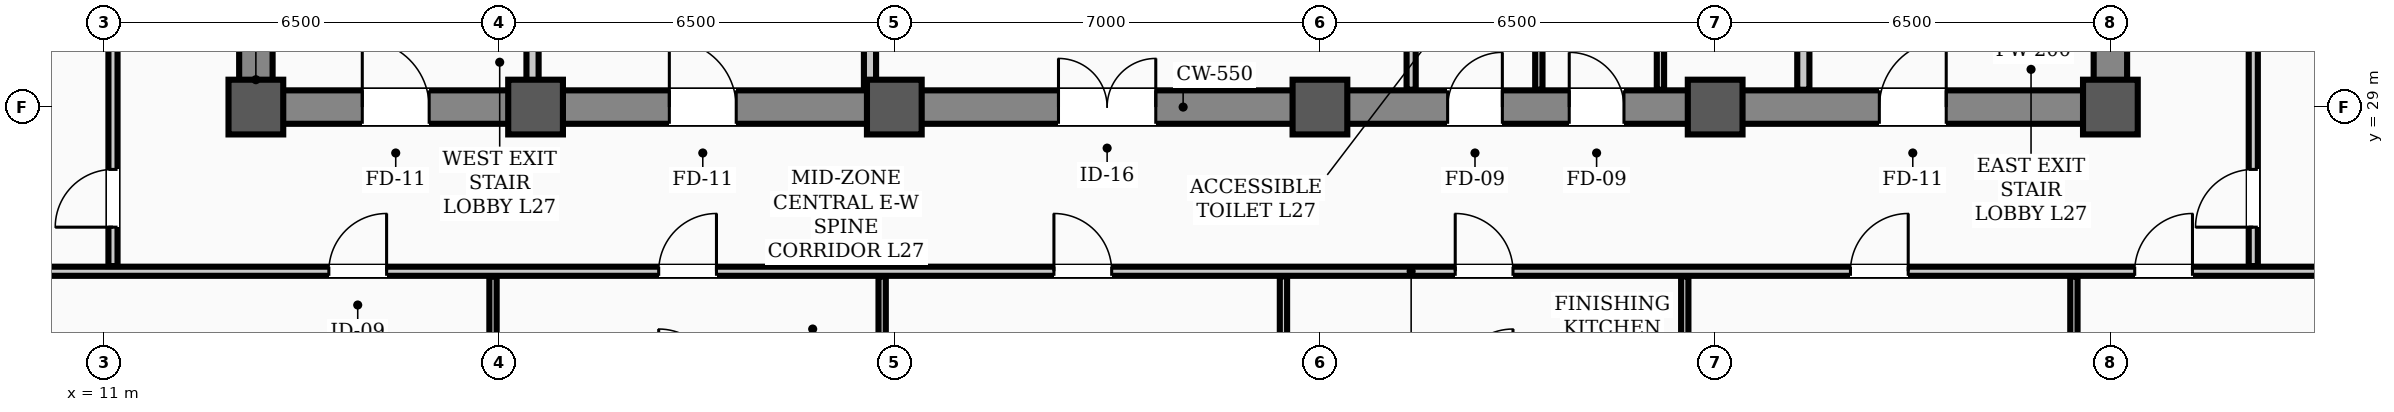
"""IFC4 building model, lengths in metres.
Left out: names, types, materials, properties, quantities, classifications, styles, units other than length and angle.
Written with IfcOpenShell. Run it as: python <this file> out.ifc"""

import sys

from ifc_helpers import new_model, si_unit, direction, frame, frame_2d, origin, origin_2d, place, context, subcontext, project, spatial, rectangle, hollow_rectangle, extrude, element, fill, save


model = new_model("IFC4")
c1 = context("Model", 3, precision=1e-05, world=origin(), true_north=direction((0.0, 1.0)))
c2 = subcontext(c1, "Body", "Model", "MODEL_VIEW")
j1 = project(units=[si_unit("LENGTHUNIT", "METRE"), si_unit("PLANEANGLEUNIT", "RADIAN")], contexts=[c1])
p1 = place(None, origin())
s1 = spatial("IfcSite", under=j1, at=p1, CompositionType="ELEMENT")
p2 = place(p1, origin())
s2 = spatial("IfcBuilding", under=s1, at=p2, CompositionType="ELEMENT")
p3 = place(p2, frame((0.0, 0.0, 111.0)))
s3 = spatial("IfcBuildingStorey", under=s2, at=p3, CompositionType="ELEMENT", Elevation=111.0)
for number, where, z_axis, x_axis in (
    (1, (13.5, 29.0, 0.0), (0.0, 0.0, 1.0), (1.0, 0.0, 0.0)),
    (2, (18.1, 29.0, 0.0), (0.0, 0.0, 1.0), (1.0, 0.0, 0.0)),
    (3, (24.0, 29.0, 0.0), (0.0, 0.0, 1.0), (1.0, 0.0, 0.0)),
    (4, (31.0, 29.0, 0.0), (0.0, 0.0, 1.0), (1.0, 0.0, 0.0)),
    (5, (37.5, 29.0, 0.0), (0.0, 0.0, 1.0), (1.0, 0.0, 0.0)),
    (6, (44.0, 29.0, 0.0), (0.0, 0.0, 1.0), (1.0, 0.0, 0.0)),
):
    element("IfcColumn", number, at=place(p3, frame(where, z_axis=z_axis, x_axis=x_axis)), inside=s3, PredefinedType="COLUMN", context=c2, shape_type="SweptSolid", body=[
        extrude(hollow_rectangle(XDim=0.9, YDim=0.9, WallThickness=0.035, InnerFilletRadius=0.017, OuterFilletRadius=0.052, at=origin_2d()), origin(), (0.0, 0.0, 1.0), 3.9),
    ])
p4 = place(p3, frame((13.5, 29.0, 0.0), z_axis=(0.0, 0.0, 1.0), x_axis=(1.0, 0.0, 0.0)))
e7 = element("IfcWall", 7, at=p4, inside=s3, PredefinedType="SHEAR", context=c2, shape_type="SweptSolid", body=[
    extrude(rectangle(XDim=30.5, YDim=0.55, at=frame_2d((15.25, 0.0))), origin(), (0.0, 0.0, 1.0), 3.66),
])
p5 = place(p4, frame((1.75, 0.0, 0.0)))
e8 = element("IfcOpeningElement", 8, at=p5, cuts=e7, PredefinedType="OPENING", context=c2, shape_type="SweptSolid", body=[
    extrude(rectangle(XDim=1.1, YDim=2.08, at=frame_2d((0.55, 1.04))), frame((0.0, 0.285, 0.0), z_axis=(0.0, -1.0, 0.0), x_axis=(1.0, 0.0, 0.0)), (0.0, 0.0, 1.0), 0.57),
])
p6 = place(p4, frame((26.7, 0.0, 0.0)))
e9 = element("IfcOpeningElement", 9, at=p6, cuts=e7, PredefinedType="OPENING", context=c2, shape_type="SweptSolid", body=[
    extrude(rectangle(XDim=1.1, YDim=2.08, at=frame_2d((0.55, 1.04))), frame((0.0, 0.285, 0.0), z_axis=(0.0, -1.0, 0.0), x_axis=(1.0, 0.0, 0.0)), (0.0, 0.0, 1.0), 0.57),
])
p7 = place(p4, frame((6.8, 0.0, 0.0)))
e10 = element("IfcOpeningElement", 10, at=p7, cuts=e7, PredefinedType="OPENING", context=c2, shape_type="SweptSolid", body=[
    extrude(rectangle(XDim=1.1, YDim=2.08, at=frame_2d((0.55, 1.04))), frame((0.0, 0.285, 0.0), z_axis=(0.0, -1.0, 0.0), x_axis=(1.0, 0.0, 0.0)), (0.0, 0.0, 1.0), 0.57),
])
p8 = place(p4, frame((13.2, 0.0, 0.0)))
e11 = element("IfcOpeningElement", 11, at=p8, cuts=e7, PredefinedType="OPENING", context=c2, shape_type="SweptSolid", body=[
    extrude(rectangle(XDim=1.6, YDim=2.08, at=frame_2d((0.8, 1.04))), frame((0.0, 0.285, 0.0), z_axis=(0.0, -1.0, 0.0), x_axis=(1.0, 0.0, 0.0)), (0.0, 0.0, 1.0), 0.57),
])
p9 = place(p4, frame((19.6, 0.0, 0.0)))
e12 = element("IfcOpeningElement", 12, at=p9, cuts=e7, PredefinedType="OPENING", context=c2, shape_type="SweptSolid", body=[
    extrude(rectangle(XDim=0.9, YDim=2.08, at=frame_2d((0.45, 1.04))), frame((0.0, 0.285, 0.0), z_axis=(0.0, -1.0, 0.0), x_axis=(1.0, 0.0, 0.0)), (0.0, 0.0, 1.0), 0.57),
])
p10 = place(p4, frame((21.6, 0.0, 0.0)))
e13 = element("IfcOpeningElement", 13, at=p10, cuts=e7, PredefinedType="OPENING", context=c2, shape_type="SweptSolid", body=[
    extrude(rectangle(XDim=0.9, YDim=2.08, at=frame_2d((0.45, 1.04))), frame((0.0, 0.285, 0.0), z_axis=(0.0, -1.0, 0.0), x_axis=(1.0, 0.0, 0.0)), (0.0, 0.0, 1.0), 0.57),
])
for number, where, z_axis, x_axis in (
    (14, (13.5, 29.35, 0.0), (0.0, 0.0, 1.0), (0.0, 1.0, 0.0)),
    (15, (44.0, 29.35, 0.0), (0.0, 0.0, 1.0), (0.0, 1.0, 0.0)),
):
    element("IfcWall", number, at=place(p3, frame(where, z_axis=z_axis, x_axis=x_axis)), inside=s3, PredefinedType="SHEAR", context=c2, shape_type="SweptSolid", body=[
        extrude(rectangle(XDim=8.6, YDim=0.55, at=frame_2d((4.3, 0.0))), origin(), (0.0, 0.0, 1.0), 3.66),
    ])
p11 = place(p3, frame((7.81, 26.3, 0.0), z_axis=(0.0, 0.0, 1.0), x_axis=(1.0, 0.0, 0.0)))
e16 = element("IfcWall", 16, at=p11, inside=s3, PredefinedType="PARTITIONING", context=c2, shape_type="SweptSolid", body=[
    extrude(rectangle(XDim=49.38, YDim=0.15, at=frame_2d((24.69, 0.0))), origin(), (0.0, 0.0, 1.0), 2.24),
])
p12 = place(p11, frame((6.89, 0.0, 0.0)))
e17 = element("IfcOpeningElement", 17, at=p12, cuts=e16, PredefinedType="OPENING", context=c2, shape_type="SweptSolid", body=[
    extrude(rectangle(XDim=0.95, YDim=2.08, at=frame_2d((0.475, 1.04))), frame((0.0, 0.085, 0.0), z_axis=(0.0, -1.0, 0.0), x_axis=(1.0, 0.0, 0.0)), (0.0, 0.0, 1.0), 0.17),
])
p13 = place(p11, frame((12.315, 0.0, 0.0)))
e18 = element("IfcOpeningElement", 18, at=p13, cuts=e16, PredefinedType="OPENING", context=c2, shape_type="SweptSolid", body=[
    extrude(rectangle(XDim=0.95, YDim=2.08, at=frame_2d((0.475, 1.04))), frame((0.0, 0.085, 0.0), z_axis=(0.0, -1.0, 0.0), x_axis=(1.0, 0.0, 0.0)), (0.0, 0.0, 1.0), 0.17),
])
p14 = place(p11, frame((18.815, 0.0, 0.0)))
e19 = element("IfcOpeningElement", 19, at=p14, cuts=e16, PredefinedType="OPENING", context=c2, shape_type="SweptSolid", body=[
    extrude(rectangle(XDim=0.95, YDim=2.08, at=frame_2d((0.475, 1.04))), frame((0.0, 0.085, 0.0), z_axis=(0.0, -1.0, 0.0), x_axis=(1.0, 0.0, 0.0)), (0.0, 0.0, 1.0), 0.17),
])
p15 = place(p11, frame((25.415, 0.0, 0.0)))
e20 = element("IfcOpeningElement", 20, at=p15, cuts=e16, PredefinedType="OPENING", context=c2, shape_type="SweptSolid", body=[
    extrude(rectangle(XDim=0.95, YDim=2.08, at=frame_2d((0.475, 1.04))), frame((0.0, 0.085, 0.0), z_axis=(0.0, -1.0, 0.0), x_axis=(1.0, 0.0, 0.0)), (0.0, 0.0, 1.0), 0.17),
])
p16 = place(p11, frame((31.915, 0.0, 0.0)))
e21 = element("IfcOpeningElement", 21, at=p16, cuts=e16, PredefinedType="OPENING", context=c2, shape_type="SweptSolid", body=[
    extrude(rectangle(XDim=0.95, YDim=2.08, at=frame_2d((0.475, 1.04))), frame((0.0, 0.085, 0.0), z_axis=(0.0, -1.0, 0.0), x_axis=(1.0, 0.0, 0.0)), (0.0, 0.0, 1.0), 0.17),
])
p17 = place(p11, frame((36.59, 0.0, 0.0)))
e22 = element("IfcOpeningElement", 22, at=p17, cuts=e16, PredefinedType="OPENING", context=c2, shape_type="SweptSolid", body=[
    extrude(rectangle(XDim=0.95, YDim=2.08, at=frame_2d((0.475, 1.04))), frame((0.0, 0.085, 0.0), z_axis=(0.0, -1.0, 0.0), x_axis=(1.0, 0.0, 0.0)), (0.0, 0.0, 1.0), 0.17),
])
for number, where, z_axis, x_axis in (
    (23, (18.05, 29.285, 0.0), (0.0, 0.0, 1.0), (0.0, 1.0, 0.0)),
    (24, (38.95, 29.285, 0.0), (0.0, 0.0, 1.0), (0.0, 1.0, 0.0)),
):
    element("IfcWall", number, at=place(p3, frame(where, z_axis=z_axis, x_axis=x_axis)), inside=s3, PredefinedType="STANDARD", context=c2, shape_type="SweptSolid", body=[
        extrude(rectangle(XDim=1.015, YDim=0.2, at=frame_2d((0.508, 0.0))), origin(), (0.0, 0.0, 1.0), 2.24),
    ])
p18 = place(p3, frame((23.6, 29.285, 0.0), z_axis=(0.0, 0.0, 1.0), x_axis=(0.0, 1.0, 0.0)))
e25 = element("IfcWall", 25, at=p18, inside=s3, PredefinedType="STANDARD", context=c2, shape_type="SweptSolid", body=[
    extrude(rectangle(XDim=5.415, YDim=0.2, at=frame_2d((2.708, 0.0))), origin(), (0.0, 0.0, 1.0), 2.24),
])
p19 = place(p3, frame((32.5, 29.285, 0.0), z_axis=(0.0, 0.0, 1.0), x_axis=(0.0, 1.0, 0.0)))
e26 = element("IfcWall", 26, at=p19, inside=s3, PredefinedType="PARTITIONING", context=c2, shape_type="SweptSolid", body=[
    extrude(rectangle(XDim=2.48, YDim=0.15, at=frame_2d((1.24, 0.0))), origin(), (0.0, 0.0, 1.0), 2.24),
])
for number, where, z_axis, x_axis in (
    (27, (36.6, 29.285, 0.0), (0.0, 0.0, 1.0), (0.0, 1.0, 0.0)),
    (28, (34.6, 29.285, 0.0), (0.0, 0.0, 1.0), (0.0, 1.0, 0.0)),
):
    element("IfcWall", number, at=place(p3, frame(where, z_axis=z_axis, x_axis=x_axis)), inside=s3, PredefinedType="PARTITIONING", context=c2, shape_type="SweptSolid", body=[
        extrude(rectangle(XDim=2.48, YDim=0.12, at=frame_2d((1.24, 0.0))), origin(), (0.0, 0.0, 1.0), 2.24),
    ])
p20 = place(p3, frame((11.15, 26.385, 0.0), z_axis=(0.0, 0.0, 1.0), x_axis=(0.0, 1.0, 0.0)))
e29 = element("IfcWall", 29, at=p20, inside=s3, PredefinedType="PARTITIONING", context=c2, shape_type="SweptSolid", body=[
    extrude(rectangle(XDim=11.83, YDim=0.15, at=frame_2d((5.915, 0.0))), origin(), (0.0, 0.0, 1.0), 2.24),
])
p21 = place(p20, frame((0.64, 0.0, 0.0)))
e30 = element("IfcOpeningElement", 30, at=p21, cuts=e29, PredefinedType="OPENING", context=c2, shape_type="SweptSolid", body=[
    extrude(rectangle(XDim=0.95, YDim=2.08, at=frame_2d((0.475, 1.04))), frame((0.0, 0.085, 0.0), z_axis=(0.0, -1.0, 0.0), x_axis=(1.0, 0.0, 0.0)), (0.0, 0.0, 1.0), 0.17),
])
p22 = place(p20, frame((8.29, 0.0, 0.0)))
e31 = element("IfcOpeningElement", 31, at=p22, cuts=e29, PredefinedType="OPENING", context=c2, shape_type="SweptSolid", body=[
    extrude(rectangle(XDim=0.95, YDim=2.08, at=frame_2d((0.475, 1.04))), frame((0.0, 0.085, 0.0), z_axis=(0.0, -1.0, 0.0), x_axis=(1.0, 0.0, 0.0)), (0.0, 0.0, 1.0), 0.17),
])
p23 = place(p3, frame((46.35, 26.385, 0.0), z_axis=(0.0, 0.0, 1.0), x_axis=(0.0, 1.0, 0.0)))
e32 = element("IfcWall", 32, at=p23, inside=s3, PredefinedType="PARTITIONING", context=c2, shape_type="SweptSolid", body=[
    extrude(rectangle(XDim=11.83, YDim=0.15, at=frame_2d((5.915, 0.0))), origin(), (0.0, 0.0, 1.0), 2.24),
])
p24 = place(p23, frame((0.64, 0.0, 0.0)))
e33 = element("IfcOpeningElement", 33, at=p24, cuts=e32, PredefinedType="OPENING", context=c2, shape_type="SweptSolid", body=[
    extrude(rectangle(XDim=0.95, YDim=2.08, at=frame_2d((0.475, 1.04))), frame((0.0, 0.085, 0.0), z_axis=(0.0, -1.0, 0.0), x_axis=(1.0, 0.0, 0.0)), (0.0, 0.0, 1.0), 0.17),
])
p25 = place(p23, frame((8.29, 0.0, 0.0)))
e34 = element("IfcOpeningElement", 34, at=p25, cuts=e32, PredefinedType="OPENING", context=c2, shape_type="SweptSolid", body=[
    extrude(rectangle(XDim=0.95, YDim=2.08, at=frame_2d((0.475, 1.04))), frame((0.0, 0.085, 0.0), z_axis=(0.0, -1.0, 0.0), x_axis=(1.0, 0.0, 0.0)), (0.0, 0.0, 1.0), 0.17),
])
p26 = place(p3, frame((17.4, 9.81, 0.0), z_axis=(0.0, 0.0, 1.0), x_axis=(0.0, 1.0, 0.0)))
e35 = element("IfcWall", 35, at=p26, inside=s3, PredefinedType="PARTITIONING", context=c2, shape_type="SweptSolid", body=[
    extrude(rectangle(XDim=16.405, YDim=0.12, at=frame_2d((8.203, 0.0))), origin(), (0.0, 0.0, 1.0), 2.24),
])
p27 = place(p3, frame((23.8, 11.57, 0.0), z_axis=(0.0, 0.0, 1.0), x_axis=(0.0, 1.0, 0.0)))
e36 = element("IfcWall", 36, at=p27, inside=s3, PredefinedType="PARTITIONING", context=c2, shape_type="SweptSolid", body=[
    extrude(rectangle(XDim=14.645, YDim=0.12, at=frame_2d((7.323, 0.0))), origin(), (0.0, 0.0, 1.0), 2.24),
])
for number, where, z_axis, x_axis in (
    (37, (30.4, 9.81, 0.0), (0.0, 0.0, 1.0), (0.0, 1.0, 0.0)),
    (38, (37.0, 9.81, 0.0), (0.0, 0.0, 1.0), (0.0, 1.0, 0.0)),
    (39, (43.4, 9.81, 0.0), (0.0, 0.0, 1.0), (0.0, 1.0, 0.0)),
):
    element("IfcWall", number, at=place(p3, frame(where, z_axis=z_axis, x_axis=x_axis)), inside=s3, PredefinedType="PARTITIONING", context=c2, shape_type="SweptSolid", body=[
        extrude(rectangle(XDim=16.405, YDim=0.12, at=frame_2d((8.203, 0.0))), origin(), (0.0, 0.0, 1.0), 2.24),
    ])
p28 = place(p5, origin())
e40 = element("IfcDoor", 40, at=p28, inside=s3, OperationType="SINGLE_SWING_LEFT", PredefinedType="DOOR", context=c2, shape_type="SweptSolid", body=[
    extrude(rectangle(XDim=1.1, YDim=2.08, at=frame_2d((0.55, 1.04))), frame((0.0, 0.025, 0.0), z_axis=(0.0, -1.0, 0.0), x_axis=(1.0, 0.0, 0.0)), (0.0, 0.0, 1.0), 0.05),
])
fill(e8, e40)
p29 = place(p6, origin())
e41 = element("IfcDoor", 41, at=p29, inside=s3, OperationType="SINGLE_SWING_RIGHT", PredefinedType="DOOR", context=c2, shape_type="SweptSolid", body=[
    extrude(rectangle(XDim=1.1, YDim=2.08, at=frame_2d((0.55, 1.04))), frame((0.0, 0.025, 0.0), z_axis=(0.0, -1.0, 0.0), x_axis=(1.0, 0.0, 0.0)), (0.0, 0.0, 1.0), 0.05),
])
fill(e9, e41)
p30 = place(p7, origin())
e42 = element("IfcDoor", 42, at=p30, inside=s3, OperationType="SINGLE_SWING_LEFT", PredefinedType="DOOR", context=c2, shape_type="SweptSolid", body=[
    extrude(rectangle(XDim=1.1, YDim=2.08, at=frame_2d((0.55, 1.04))), frame((0.0, 0.025, 0.0), z_axis=(0.0, -1.0, 0.0), x_axis=(1.0, 0.0, 0.0)), (0.0, 0.0, 1.0), 0.05),
])
fill(e10, e42)
p31 = place(p8, origin())
e43 = element("IfcDoor", 43, at=p31, inside=s3, OperationType="DOUBLE_DOOR_SINGLE_SWING", PredefinedType="DOOR", context=c2, shape_type="SweptSolid", body=[
    extrude(rectangle(XDim=1.6, YDim=2.08, at=frame_2d((0.8, 1.04))), frame((0.0, 0.025, 0.0), z_axis=(0.0, -1.0, 0.0), x_axis=(1.0, 0.0, 0.0)), (0.0, 0.0, 1.0), 0.05),
])
fill(e11, e43)
p32 = place(p9, origin())
e44 = element("IfcDoor", 44, at=p32, inside=s3, OperationType="SINGLE_SWING_RIGHT", PredefinedType="DOOR", context=c2, shape_type="SweptSolid", body=[
    extrude(rectangle(XDim=0.9, YDim=2.08, at=frame_2d((0.45, 1.04))), frame((0.0, 0.025, 0.0), z_axis=(0.0, -1.0, 0.0), x_axis=(1.0, 0.0, 0.0)), (0.0, 0.0, 1.0), 0.05),
])
fill(e12, e44)
p33 = place(p10, origin())
e45 = element("IfcDoor", 45, at=p33, inside=s3, OperationType="SINGLE_SWING_LEFT", PredefinedType="DOOR", context=c2, shape_type="SweptSolid", body=[
    extrude(rectangle(XDim=0.9, YDim=2.08, at=frame_2d((0.45, 1.04))), frame((0.0, 0.025, 0.0), z_axis=(0.0, -1.0, 0.0), x_axis=(1.0, 0.0, 0.0)), (0.0, 0.0, 1.0), 0.05),
])
fill(e13, e45)
p34 = place(p12, origin())
e46 = element("IfcDoor", 46, at=p34, inside=s3, OperationType="SINGLE_SWING_RIGHT", PredefinedType="DOOR", context=c2, shape_type="SweptSolid", body=[
    extrude(rectangle(XDim=0.95, YDim=2.08, at=frame_2d((0.475, 1.04))), frame((0.0, 0.025, 0.0), z_axis=(0.0, -1.0, 0.0), x_axis=(1.0, 0.0, 0.0)), (0.0, 0.0, 1.0), 0.05),
])
fill(e17, e46)
p35 = place(p13, origin())
e47 = element("IfcDoor", 47, at=p35, inside=s3, OperationType="SINGLE_SWING_RIGHT", PredefinedType="DOOR", context=c2, shape_type="SweptSolid", body=[
    extrude(rectangle(XDim=0.95, YDim=2.08, at=frame_2d((0.475, 1.04))), frame((0.0, 0.025, 0.0), z_axis=(0.0, -1.0, 0.0), x_axis=(1.0, 0.0, 0.0)), (0.0, 0.0, 1.0), 0.05),
])
fill(e18, e47)
p36 = place(p14, origin())
e48 = element("IfcDoor", 48, at=p36, inside=s3, OperationType="SINGLE_SWING_LEFT", PredefinedType="DOOR", context=c2, shape_type="SweptSolid", body=[
    extrude(rectangle(XDim=0.95, YDim=2.08, at=frame_2d((0.475, 1.04))), frame((0.0, 0.025, 0.0), z_axis=(0.0, -1.0, 0.0), x_axis=(1.0, 0.0, 0.0)), (0.0, 0.0, 1.0), 0.05),
])
fill(e19, e48)
p37 = place(p15, origin())
e49 = element("IfcDoor", 49, at=p37, inside=s3, OperationType="SINGLE_SWING_LEFT", PredefinedType="DOOR", context=c2, shape_type="SweptSolid", body=[
    extrude(rectangle(XDim=0.95, YDim=2.08, at=frame_2d((0.475, 1.04))), frame((0.0, 0.025, 0.0), z_axis=(0.0, -1.0, 0.0), x_axis=(1.0, 0.0, 0.0)), (0.0, 0.0, 1.0), 0.05),
])
fill(e20, e49)
p38 = place(p16, origin())
e50 = element("IfcDoor", 50, at=p38, inside=s3, OperationType="SINGLE_SWING_RIGHT", PredefinedType="DOOR", context=c2, shape_type="SweptSolid", body=[
    extrude(rectangle(XDim=0.95, YDim=2.08, at=frame_2d((0.475, 1.04))), frame((0.0, 0.025, 0.0), z_axis=(0.0, -1.0, 0.0), x_axis=(1.0, 0.0, 0.0)), (0.0, 0.0, 1.0), 0.05),
])
fill(e21, e50)
p39 = place(p17, origin())
e51 = element("IfcDoor", 51, at=p39, inside=s3, OperationType="SINGLE_SWING_RIGHT", PredefinedType="DOOR", context=c2, shape_type="SweptSolid", body=[
    extrude(rectangle(XDim=0.95, YDim=2.08, at=frame_2d((0.475, 1.04))), frame((0.0, 0.025, 0.0), z_axis=(0.0, -1.0, 0.0), x_axis=(1.0, 0.0, 0.0)), (0.0, 0.0, 1.0), 0.05),
])
fill(e22, e51)
p40 = place(p21, origin())
e52 = element("IfcDoor", 52, at=p40, inside=s3, OperationType="SINGLE_SWING_LEFT", PredefinedType="DOOR", context=c2, shape_type="SweptSolid", body=[
    extrude(rectangle(XDim=0.95, YDim=2.08, at=frame_2d((0.475, 1.04))), frame((0.0, 0.025, 0.0), z_axis=(0.0, -1.0, 0.0), x_axis=(1.0, 0.0, 0.0)), (0.0, 0.0, 1.0), 0.05),
])
fill(e30, e52)
p41 = place(p24, origin())
e53 = element("IfcDoor", 53, at=p41, inside=s3, OperationType="SINGLE_SWING_LEFT", PredefinedType="DOOR", context=c2, shape_type="SweptSolid", body=[
    extrude(rectangle(XDim=0.95, YDim=2.08, at=frame_2d((0.475, 1.04))), frame((0.0, 0.025, 0.0), z_axis=(0.0, -1.0, 0.0), x_axis=(1.0, 0.0, 0.0)), (0.0, 0.0, 1.0), 0.05),
])
fill(e33, e53)
save(model, sys.argv[1])
